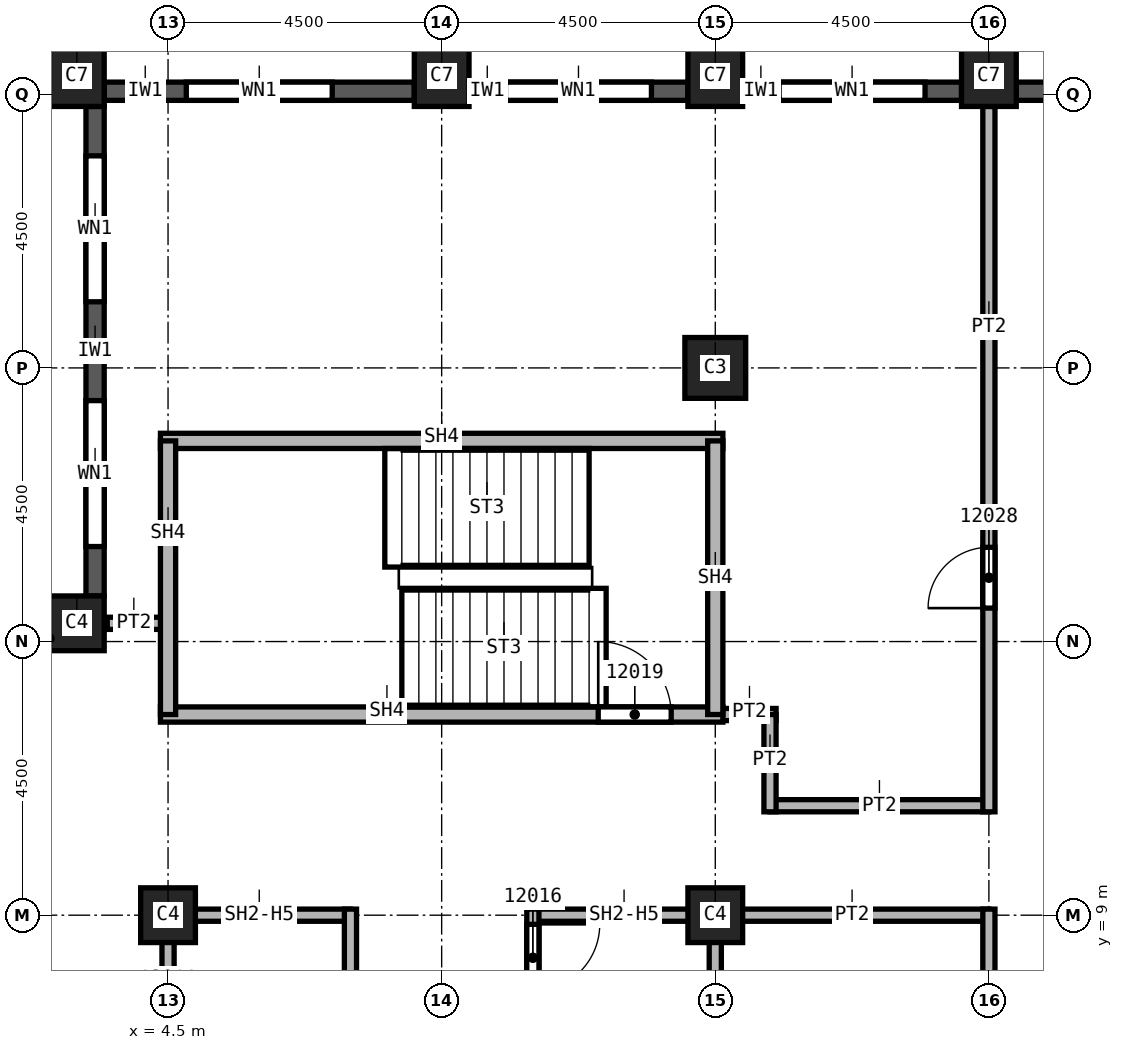
"""IFC4 building model, lengths in metres.
Left out: names, types, materials, properties, quantities, classifications, styles, units other than length and angle.
Written with IfcOpenShell. Run it as: python <this file> out.ifc"""

import sys

from ifc_helpers import new_model, si_unit, direction, frame, frame_2d, origin, origin_2d, place, context, subcontext, project, spatial, rectangle, extrude, element, fill, save


model = new_model("IFC4")
c1 = context("Model", 3, precision=1e-05, world=origin(), true_north=direction((0.0, 1.0)))
c2 = subcontext(c1, "Body", "Model", "MODEL_VIEW")
j1 = project(units=[si_unit("LENGTHUNIT", "METRE"), si_unit("PLANEANGLEUNIT", "RADIAN")], contexts=[c1])
p1 = place(None, origin())
s1 = spatial("IfcSite", under=j1, at=p1, CompositionType="ELEMENT")
p2 = place(p1, origin())
s2 = spatial("IfcBuilding", under=s1, at=p2, CompositionType="ELEMENT")
p3 = place(p2, frame((0.0, 0.0, 196.0)))
s3 = spatial("IfcBuildingStorey", under=s2, at=p3, CompositionType="ELEMENT", Elevation=196.0)
p4 = place(p3, frame((13.5, 18.0, 0.0), z_axis=(0.0, 0.0, 1.0), x_axis=(1.0, 0.0, 0.0)))
e1 = element("IfcColumn", 1, at=p4, inside=s3, PredefinedType="COLUMN", context=c2, shape_type="SweptSolid", body=[
    extrude(rectangle(XDim=1.0, YDim=1.0, at=origin_2d()), origin(), (0.0, 0.0, 1.0), 3.72),
])
for number, where, z_axis, x_axis in (
    (2, (4.5, 9.0, 0.0), (0.0, 0.0, 1.0), (1.0, 0.0, 0.0)),
    (3, (13.5, 9.0, 0.0), (0.0, 0.0, 1.0), (1.0, 0.0, 0.0)),
):
    element("IfcColumn", number, at=place(p3, frame(where, z_axis=z_axis, x_axis=x_axis)), inside=s3, PredefinedType="COLUMN", context=c2, shape_type="SweptSolid", body=[
        extrude(rectangle(XDim=0.9, YDim=0.9, at=origin_2d()), origin(), (0.0, 0.0, 1.0), 3.72),
    ])
for number, where, z_axis, x_axis in (
    (4, (3.0, 22.8, 0.0), (0.0, 0.0, 1.0), (1.0, 0.0, 0.0)),
    (5, (9.0, 22.8, 0.0), (0.0, 0.0, 1.0), (1.0, 0.0, 0.0)),
    (6, (13.5, 22.8, 0.0), (0.0, 0.0, 1.0), (1.0, 0.0, 0.0)),
    (7, (18.0, 22.8, 0.0), (0.0, 0.0, 1.0), (1.0, 0.0, 0.0)),
):
    element("IfcColumn", number, at=place(p3, frame(where, z_axis=z_axis, x_axis=x_axis)), inside=s3, PredefinedType="COLUMN", context=c2, shape_type="SweptSolid", body=[
        extrude(rectangle(XDim=0.9, YDim=1.0, at=origin_2d()), origin(), (0.0, 0.0, 1.0), 3.72),
    ])
p5 = place(p3, frame((3.0, 13.8, 0.0), z_axis=(0.0, 0.0, 1.0), x_axis=(1.0, 0.0, 0.0)))
e8 = element("IfcColumn", 8, at=p5, inside=s3, PredefinedType="COLUMN", context=c2, shape_type="SweptSolid", body=[
    extrude(rectangle(XDim=0.9, YDim=0.9, at=origin_2d()), origin(), (0.0, 0.0, 1.0), 3.72),
])
p6 = place(p3, frame((22.05, 22.55, 0.0), z_axis=(0.0, 0.0, 1.0), x_axis=(-1.0, 0.0, 0.0)))
e9 = element("IfcWall", 9, at=p6, inside=s3, PredefinedType="SOLIDWALL", context=c2, shape_type="SweptSolid", body=[
    extrude(rectangle(XDim=3.6, YDim=0.3, at=frame_2d((1.8, 0.0))), origin(), (0.0, 0.0, 1.0), 3.12),
])
p7 = place(p6, frame((0.775, 0.0, 0.8)))
e10 = element("IfcOpeningElement", 10, at=p7, cuts=e9, PredefinedType="OPENING", context=c2, shape_type="SweptSolid", body=[
    extrude(rectangle(XDim=1.0, YDim=1.95, at=frame_2d((0.5, 0.975))), frame((0.0, 0.15, 0.0), z_axis=(0.0, -1.0, 0.0), x_axis=(1.0, 0.0, 0.0)), (0.0, 0.0, 1.0), 0.3),
])
p8 = place(p6, frame((2.375, 0.0, 0.8)))
e11 = element("IfcOpeningElement", 11, at=p8, cuts=e9, PredefinedType="OPENING", context=c2, shape_type="SweptSolid", body=[
    extrude(rectangle(XDim=0.6, YDim=1.95, at=frame_2d((0.3, 0.975))), frame((0.0, 0.15, 0.0), z_axis=(0.0, -1.0, 0.0), x_axis=(1.0, 0.0, 0.0)), (0.0, 0.0, 1.0), 0.3),
])
p9 = place(p3, frame((17.55, 22.55, 0.0), z_axis=(0.0, 0.0, 1.0), x_axis=(-1.0, 0.0, 0.0)))
e12 = element("IfcWall", 12, at=p9, inside=s3, PredefinedType="SOLIDWALL", context=c2, shape_type="SweptSolid", body=[
    extrude(rectangle(XDim=3.6, YDim=0.3, at=frame_2d((1.8, 0.0))), origin(), (0.0, 0.0, 1.0), 3.12),
])
p10 = place(p9, frame((0.6, 0.0, 0.8)))
e13 = element("IfcOpeningElement", 13, at=p10, cuts=e12, PredefinedType="OPENING", context=c2, shape_type="SweptSolid", body=[
    extrude(rectangle(XDim=2.4, YDim=1.95, at=frame_2d((1.2, 0.975))), frame((0.0, 0.15, 0.0), z_axis=(0.0, -1.0, 0.0), x_axis=(1.0, 0.0, 0.0)), (0.0, 0.0, 1.0), 0.3),
])
p11 = place(p3, frame((13.05, 22.55, 0.0), z_axis=(0.0, 0.0, 1.0), x_axis=(-1.0, 0.0, 0.0)))
e14 = element("IfcWall", 14, at=p11, inside=s3, PredefinedType="SOLIDWALL", context=c2, shape_type="SweptSolid", body=[
    extrude(rectangle(XDim=3.6, YDim=0.3, at=frame_2d((1.8, 0.0))), origin(), (0.0, 0.0, 1.0), 3.12),
])
p12 = place(p11, frame((0.6, 0.0, 0.8)))
e15 = element("IfcOpeningElement", 15, at=p12, cuts=e14, PredefinedType="OPENING", context=c2, shape_type="SweptSolid", body=[
    extrude(rectangle(XDim=2.4, YDim=1.95, at=frame_2d((1.2, 0.975))), frame((0.0, 0.15, 0.0), z_axis=(0.0, -1.0, 0.0), x_axis=(1.0, 0.0, 0.0)), (0.0, 0.0, 1.0), 0.3),
])
p13 = place(p3, frame((8.55, 22.55, 0.0), z_axis=(0.0, 0.0, 1.0), x_axis=(-1.0, 0.0, 0.0)))
e16 = element("IfcWall", 16, at=p13, inside=s3, PredefinedType="SOLIDWALL", context=c2, shape_type="SweptSolid", body=[
    extrude(rectangle(XDim=5.1, YDim=0.3, at=frame_2d((2.55, 0.0))), origin(), (0.0, 0.0, 1.0), 3.12),
])
p14 = place(p13, frame((1.35, 0.0, 0.8)))
e17 = element("IfcOpeningElement", 17, at=p14, cuts=e16, PredefinedType="OPENING", context=c2, shape_type="SweptSolid", body=[
    extrude(rectangle(XDim=2.4, YDim=1.95, at=frame_2d((1.2, 0.975))), frame((0.0, 0.15, 0.0), z_axis=(0.0, -1.0, 0.0), x_axis=(1.0, 0.0, 0.0)), (0.0, 0.0, 1.0), 0.3),
])
p15 = place(p3, frame((3.3, 22.3, 0.0), z_axis=(0.0, 0.0, 1.0), x_axis=(0.0, -1.0, 0.0)))
e18 = element("IfcWall", 18, at=p15, inside=s3, PredefinedType="SOLIDWALL", context=c2, shape_type="SweptSolid", body=[
    extrude(rectangle(XDim=8.05, YDim=0.3, at=frame_2d((4.025, 0.0))), origin(), (0.0, 0.0, 1.0), 3.12),
])
p16 = place(p15, frame((0.812, 0.0, 0.8)))
e19 = element("IfcOpeningElement", 19, at=p16, cuts=e18, PredefinedType="OPENING", context=c2, shape_type="SweptSolid", body=[
    extrude(rectangle(XDim=2.4, YDim=1.95, at=frame_2d((1.2, 0.975))), frame((0.0, 0.15, 0.0), z_axis=(0.0, -1.0, 0.0), x_axis=(1.0, 0.0, 0.0)), (0.0, 0.0, 1.0), 0.3),
])
p17 = place(p15, frame((4.837, 0.0, 0.8)))
e20 = element("IfcOpeningElement", 20, at=p17, cuts=e18, PredefinedType="OPENING", context=c2, shape_type="SweptSolid", body=[
    extrude(rectangle(XDim=2.4, YDim=1.95, at=frame_2d((1.2, 0.975))), frame((0.0, 0.15, 0.0), z_axis=(0.0, -1.0, 0.0), x_axis=(1.0, 0.0, 0.0)), (0.0, 0.0, 1.0), 0.3),
])
p18 = place(p3, frame((3.5, 13.8, 0.0), z_axis=(0.0, 0.0, 1.0), x_axis=(1.0, 0.0, 0.0)))
e21 = element("IfcWall", 21, at=p18, inside=s3, PredefinedType="PARTITIONING", context=c2, shape_type="SweptSolid", body=[
    extrude(rectangle(XDim=1.0, YDim=0.2, at=frame_2d((0.5, 0.0))), origin(), (0.0, 0.0, 1.0), 3.72),
])
p19 = place(p3, frame((13.375, 12.3, 0.0), z_axis=(0.0, 0.0, 1.0), x_axis=(1.0, 0.0, 0.0)))
e22 = element("IfcWall", 22, at=p19, inside=s3, PredefinedType="PARTITIONING", context=c2, shape_type="SweptSolid", body=[
    extrude(rectangle(XDim=1.125, YDim=0.2, at=frame_2d((0.562, 0.0))), origin(), (0.0, 0.0, 1.0), 3.72),
])
p20 = place(p3, frame((18.0, 9.0, 0.0), z_axis=(0.0, 0.0, 1.0), x_axis=(-1.0, 0.0, 0.0)))
e23 = element("IfcWall", 23, at=p20, inside=s3, PredefinedType="PARTITIONING", context=c2, shape_type="SweptSolid", body=[
    extrude(rectangle(XDim=4.5, YDim=0.2, at=frame_2d((2.25, 0.0))), origin(), (0.0, 0.0, 1.0), 3.72),
])
p21 = place(p3, frame((14.4, 10.8, 0.0), z_axis=(0.0, 0.0, 1.0), x_axis=(1.0, 0.0, 0.0)))
e24 = element("IfcWall", 24, at=p21, inside=s3, PredefinedType="PARTITIONING", context=c2, shape_type="SweptSolid", body=[
    extrude(rectangle(XDim=3.6, YDim=0.2, at=frame_2d((1.8, 0.0))), origin(), (0.0, 0.0, 1.0), 3.72),
])
p22 = place(p3, frame((14.4, 12.3, 0.0), z_axis=(0.0, 0.0, 1.0), x_axis=(0.0, -1.0, 0.0)))
e25 = element("IfcWall", 25, at=p22, inside=s3, PredefinedType="PARTITIONING", context=c2, shape_type="SweptSolid", body=[
    extrude(rectangle(XDim=1.6, YDim=0.2, at=frame_2d((0.8, 0.0))), origin(), (0.0, 0.0, 1.0), 3.72),
])
p23 = place(p3, frame((18.0, -9.1, 0.0), z_axis=(0.0, 0.0, 1.0), x_axis=(0.0, 1.0, 0.0)))
e26 = element("IfcWall", 26, at=p23, inside=s3, PredefinedType="PARTITIONING", context=c2, shape_type="SweptSolid", body=[
    extrude(rectangle(XDim=18.2, YDim=0.2, at=frame_2d((9.1, 0.0))), origin(), (0.0, 0.0, 1.0), 3.72),
])
p24 = place(p23, frame((2.95, 0.0, 0.0)))
e27 = element("IfcOpeningElement", 27, at=p24, cuts=e26, PredefinedType="OPENING", context=c2, shape_type="SweptSolid", body=[
    extrude(rectangle(XDim=1.0, YDim=2.1, at=frame_2d((0.5, 1.05))), frame((0.0, 0.1, 0.0), z_axis=(0.0, -1.0, 0.0), x_axis=(1.0, 0.0, 0.0)), (0.0, 0.0, 1.0), 0.2),
])
p25 = place(p23, frame((11.05, 0.0, 0.0)))
e28 = element("IfcOpeningElement", 28, at=p25, cuts=e26, PredefinedType="OPENING", context=c2, shape_type="SweptSolid", body=[
    extrude(rectangle(XDim=1.0, YDim=2.1, at=frame_2d((0.5, 1.05))), frame((0.0, 0.1, 0.0), z_axis=(0.0, -1.0, 0.0), x_axis=(1.0, 0.0, 0.0)), (0.0, 0.0, 1.0), 0.2),
])
p26 = place(p3, frame((18.0, 10.7, 0.0), z_axis=(0.0, 0.0, 1.0), x_axis=(0.0, 1.0, 0.0)))
e29 = element("IfcWall", 29, at=p26, inside=s3, PredefinedType="PARTITIONING", context=c2, shape_type="SweptSolid", body=[
    extrude(rectangle(XDim=11.6, YDim=0.2, at=frame_2d((5.8, 0.0))), origin(), (0.0, 0.0, 1.0), 3.72),
])
p27 = place(p26, frame((3.35, 0.0, 0.0)))
e30 = element("IfcOpeningElement", 30, at=p27, cuts=e29, PredefinedType="OPENING", context=c2, shape_type="SweptSolid", body=[
    extrude(rectangle(XDim=1.0, YDim=2.1, at=frame_2d((0.5, 1.05))), frame((0.0, 0.1, 0.0), z_axis=(0.0, -1.0, 0.0), x_axis=(1.0, 0.0, 0.0)), (0.0, 0.0, 1.0), 0.2),
])
p28 = place(p3, frame((4.5, 0.0, 0.0), z_axis=(0.0, 0.0, 1.0), x_axis=(0.0, 1.0, 0.0)))
e31 = element("IfcWall", 31, at=p28, inside=s3, PredefinedType="SOLIDWALL", context=c2, shape_type="SweptSolid", body=[
    extrude(rectangle(XDim=9.1, YDim=0.2, at=frame_2d((4.55, 0.0))), origin(), (0.0, 0.0, 1.0), 2.958),
])
p29 = place(p28, frame((1.6, 0.0, 0.0)))
e32 = element("IfcOpeningElement", 32, at=p29, cuts=e31, PredefinedType="OPENING", context=c2, shape_type="SweptSolid", body=[
    extrude(rectangle(XDim=1.1, YDim=2.1, at=frame_2d((0.55, 1.05))), frame((0.0, 0.1, 0.0), z_axis=(0.0, -1.0, 0.0), x_axis=(1.0, 0.0, 0.0)), (0.0, 0.0, 1.0), 0.2),
])
p30 = place(p28, frame((6.4, 0.0, 0.0)))
e33 = element("IfcOpeningElement", 33, at=p30, cuts=e31, PredefinedType="OPENING", context=c2, shape_type="SweptSolid", body=[
    extrude(rectangle(XDim=1.1, YDim=2.1, at=frame_2d((0.55, 1.05))), frame((0.0, 0.1, 0.0), z_axis=(0.0, -1.0, 0.0), x_axis=(1.0, 0.0, 0.0)), (0.0, 0.0, 1.0), 0.2),
])
p31 = place(p3, frame((4.5, 9.0, 0.0), z_axis=(0.0, 0.0, 1.0), x_axis=(1.0, 0.0, 0.0)))
e34 = element("IfcWall", 34, at=p31, inside=s3, PredefinedType="SOLIDWALL", context=c2, shape_type="SweptSolid", body=[
    extrude(rectangle(XDim=3.0, YDim=0.2, at=frame_2d((1.5, 0.0))), origin(), (0.0, 0.0, 1.0), 2.958),
])
p32 = place(p3, frame((7.5, 9.1, 0.0), z_axis=(0.0, 0.0, 1.0), x_axis=(0.0, -1.0, 0.0)))
e35 = element("IfcWall", 35, at=p32, inside=s3, PredefinedType="SOLIDWALL", context=c2, shape_type="SweptSolid", body=[
    extrude(rectangle(XDim=6.225, YDim=0.2, at=frame_2d((3.113, 0.0))), origin(), (0.0, 0.0, 1.0), 3.72),
])
p33 = place(p3, frame((10.5, 9.0, 0.0), z_axis=(0.0, 0.0, 1.0), x_axis=(1.0, 0.0, 0.0)))
e36 = element("IfcWall", 36, at=p33, inside=s3, PredefinedType="SOLIDWALL", context=c2, shape_type="SweptSolid", body=[
    extrude(rectangle(XDim=3.1, YDim=0.2, at=frame_2d((1.55, 0.0))), origin(), (0.0, 0.0, 1.0), 2.958),
])
p34 = place(p3, frame((10.5, 9.1, 0.0), z_axis=(0.0, 0.0, 1.0), x_axis=(0.0, -1.0, 0.0)))
e37 = element("IfcWall", 37, at=p34, inside=s3, PredefinedType="SOLIDWALL", context=c2, shape_type="SweptSolid", body=[
    extrude(rectangle(XDim=3.225, YDim=0.2, at=frame_2d((1.613, 0.0))), origin(), (0.0, 0.0, 1.0), 3.72),
])
p35 = place(p34, frame((0.25, 0.0, 0.0)))
e38 = element("IfcOpeningElement", 38, at=p35, cuts=e37, PredefinedType="OPENING", context=c2, shape_type="SweptSolid", body=[
    extrude(rectangle(XDim=1.1, YDim=2.1, at=frame_2d((0.55, 1.05))), frame((0.0, 0.1, 0.0), z_axis=(0.0, -1.0, 0.0), x_axis=(1.0, 0.0, 0.0)), (0.0, 0.0, 1.0), 0.2),
])
p36 = place(p3, frame((13.5, 9.1, 0.0), z_axis=(0.0, 0.0, 1.0), x_axis=(0.0, -1.0, 0.0)))
e39 = element("IfcWall", 39, at=p36, inside=s3, PredefinedType="SOLIDWALL", context=c2, shape_type="SweptSolid", body=[
    extrude(rectangle(XDim=3.1, YDim=0.2, at=frame_2d((1.55, 0.0))), origin(), (0.0, 0.0, 1.0), 2.958),
])
p37 = place(p3, frame((4.375, 12.3, 0.0), z_axis=(0.0, 0.0, 1.0), x_axis=(1.0, 0.0, 0.0)))
e40 = element("IfcWall", 40, at=p37, inside=s3, PredefinedType="SOLIDWALL", context=c2, shape_type="SweptSolid", body=[
    extrude(rectangle(XDim=9.25, YDim=0.25, at=frame_2d((4.625, 0.0))), origin(), (0.0, 0.0, 1.0), 3.72),
])
p38 = place(p37, frame((7.2, 0.0, 0.0)))
e41 = element("IfcOpeningElement", 41, at=p38, cuts=e40, PredefinedType="OPENING", context=c2, shape_type="SweptSolid", body=[
    extrude(rectangle(XDim=1.2, YDim=2.1, at=frame_2d((0.6, 1.05))), frame((0.0, 0.125, 0.0), z_axis=(0.0, -1.0, 0.0), x_axis=(1.0, 0.0, 0.0)), (0.0, 0.0, 1.0), 0.25),
])
p39 = place(p3, frame((4.375, 16.8, 0.0), z_axis=(0.0, 0.0, 1.0), x_axis=(1.0, 0.0, 0.0)))
e42 = element("IfcWall", 42, at=p39, inside=s3, PredefinedType="SOLIDWALL", context=c2, shape_type="SweptSolid", body=[
    extrude(rectangle(XDim=9.25, YDim=0.25, at=frame_2d((4.625, 0.0))), origin(), (0.0, 0.0, 1.0), 3.72),
])
for number, where, z_axis, x_axis in (
    (43, (4.5, 12.3, 0.0), (0.0, 0.0, 1.0), (0.0, 1.0, 0.0)),
    (44, (13.5, 16.8, 0.0), (0.0, 0.0, 1.0), (0.0, -1.0, 0.0)),
):
    element("IfcWall", number, at=place(p3, frame(where, z_axis=z_axis, x_axis=x_axis)), inside=s3, PredefinedType="SOLIDWALL", context=c2, shape_type="SweptSolid", body=[
        extrude(rectangle(XDim=4.5, YDim=0.25, at=frame_2d((2.25, 0.0))), origin(), (0.0, 0.0, 1.0), 3.72),
    ])
p40 = place(p10, origin())
e45 = element("IfcWindow", 45, at=p40, inside=s3, PartitioningType="SINGLE_PANEL", PredefinedType="WINDOW", context=c2, shape_type="SweptSolid", body=[
    extrude(rectangle(XDim=2.4, YDim=1.95, at=frame_2d((1.2, 0.975))), frame((0.0, 0.03, 0.0), z_axis=(0.0, -1.0, 0.0), x_axis=(1.0, 0.0, 0.0)), (0.0, 0.0, 1.0), 0.06),
])
fill(e13, e45)
p41 = place(p12, origin())
e46 = element("IfcWindow", 46, at=p41, inside=s3, PartitioningType="SINGLE_PANEL", PredefinedType="WINDOW", context=c2, shape_type="SweptSolid", body=[
    extrude(rectangle(XDim=2.4, YDim=1.95, at=frame_2d((1.2, 0.975))), frame((0.0, 0.03, 0.0), z_axis=(0.0, -1.0, 0.0), x_axis=(1.0, 0.0, 0.0)), (0.0, 0.0, 1.0), 0.06),
])
fill(e15, e46)
p42 = place(p14, origin())
e47 = element("IfcWindow", 47, at=p42, inside=s3, PartitioningType="SINGLE_PANEL", PredefinedType="WINDOW", context=c2, shape_type="SweptSolid", body=[
    extrude(rectangle(XDim=2.4, YDim=1.95, at=frame_2d((1.2, 0.975))), frame((0.0, 0.03, 0.0), z_axis=(0.0, -1.0, 0.0), x_axis=(1.0, 0.0, 0.0)), (0.0, 0.0, 1.0), 0.06),
])
fill(e17, e47)
p43 = place(p16, origin())
e48 = element("IfcWindow", 48, at=p43, inside=s3, PartitioningType="SINGLE_PANEL", PredefinedType="WINDOW", context=c2, shape_type="SweptSolid", body=[
    extrude(rectangle(XDim=2.4, YDim=1.95, at=frame_2d((1.2, 0.975))), frame((0.0, 0.03, 0.0), z_axis=(0.0, -1.0, 0.0), x_axis=(1.0, 0.0, 0.0)), (0.0, 0.0, 1.0), 0.06),
])
fill(e19, e48)
p44 = place(p17, origin())
e49 = element("IfcWindow", 49, at=p44, inside=s3, PartitioningType="SINGLE_PANEL", PredefinedType="WINDOW", context=c2, shape_type="SweptSolid", body=[
    extrude(rectangle(XDim=2.4, YDim=1.95, at=frame_2d((1.2, 0.975))), frame((0.0, 0.03, 0.0), z_axis=(0.0, -1.0, 0.0), x_axis=(1.0, 0.0, 0.0)), (0.0, 0.0, 1.0), 0.06),
])
fill(e20, e49)
p45 = place(p35, origin())
e50 = element("IfcDoor", 50, at=p45, inside=s3, OperationType="SINGLE_SWING_LEFT", PredefinedType="DOOR", context=c2, shape_type="SweptSolid", body=[
    extrude(rectangle(XDim=1.1, YDim=2.1, at=frame_2d((0.55, 1.05))), frame((0.0, 0.025, 0.0), z_axis=(0.0, -1.0, 0.0), x_axis=(1.0, 0.0, 0.0)), (0.0, 0.0, 1.0), 0.05),
])
fill(e38, e50)
p46 = place(p38, origin())
e51 = element("IfcDoor", 51, at=p46, inside=s3, OperationType="SINGLE_SWING_RIGHT", PredefinedType="DOOR", context=c2, shape_type="SweptSolid", body=[
    extrude(rectangle(XDim=1.2, YDim=2.1, at=frame_2d((0.6, 1.05))), frame((0.0, 0.025, 0.0), z_axis=(0.0, -1.0, 0.0), x_axis=(1.0, 0.0, 0.0)), (0.0, 0.0, 1.0), 0.05),
])
fill(e41, e51)
p47 = place(p27, origin())
e52 = element("IfcDoor", 52, at=p47, inside=s3, OperationType="SINGLE_SWING_LEFT", PredefinedType="DOOR", context=c2, shape_type="SweptSolid", body=[
    extrude(rectangle(XDim=1.0, YDim=2.1, at=frame_2d((0.5, 1.05))), frame((0.0, 0.025, 0.0), z_axis=(0.0, -1.0, 0.0), x_axis=(1.0, 0.0, 0.0)), (0.0, 0.0, 1.0), 0.05),
])
fill(e30, e52)
save(model, sys.argv[1])
